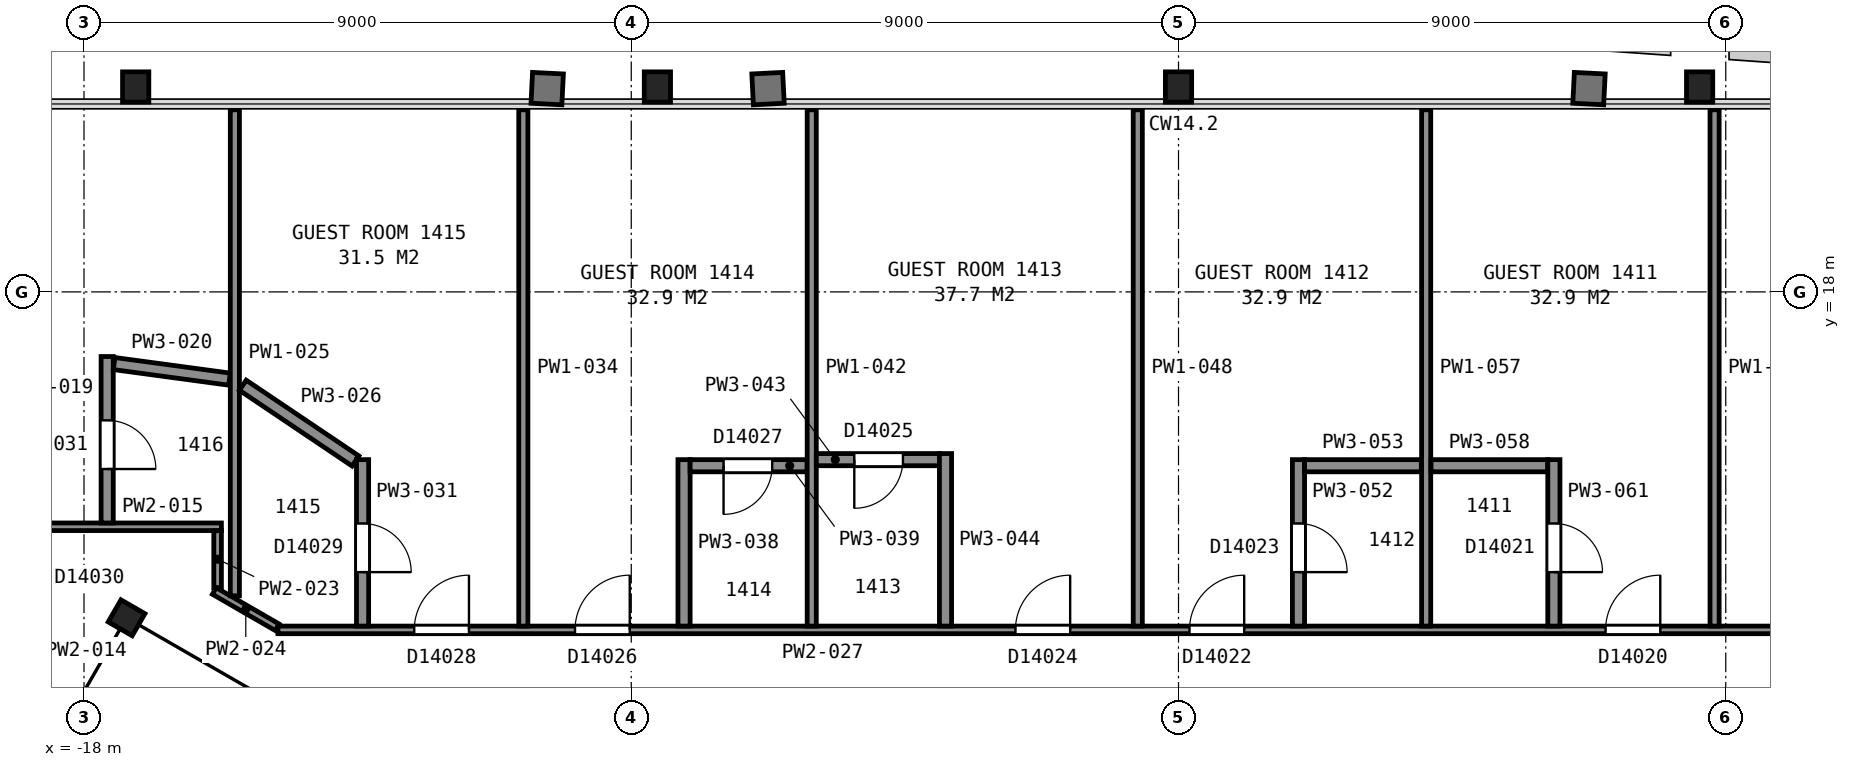
"""IFC4 building model, lengths in metres.
Left out: names, types, materials, properties, quantities, classifications, styles, units other than length and angle.
Written with IfcOpenShell. Run it as: python <this file> out.ifc"""

import sys

from ifc_helpers import new_model, si_unit, direction, frame, frame_2d, origin, origin_2d, place, context, subcontext, project, spatial, rectangle, i_section, extrude, element, fill, save


model = new_model("IFC4")
c1 = context("Model", 3, precision=1e-05, world=origin(), true_north=direction((0.0, 1.0)))
c2 = subcontext(c1, "Body", "Model", "MODEL_VIEW")
j1 = project(units=[si_unit("LENGTHUNIT", "METRE"), si_unit("PLANEANGLEUNIT", "RADIAN")], contexts=[c1])
p1 = place(None, origin())
s1 = spatial("IfcSite", under=j1, at=p1, CompositionType="ELEMENT")
p2 = place(p1, origin())
s2 = spatial("IfcBuilding", under=s1, at=p2, CompositionType="ELEMENT")
p3 = place(p2, frame((0.0, 0.0, 65.6)))
s3 = spatial("IfcBuildingStorey", under=s2, at=p3, CompositionType="ELEMENT", Elevation=65.6)
for number, where, z_axis, x_axis in (
    (1, (8.57, 21.37, 0.025), (0.0, 0.0, 1.0), (1.0, 0.0, 0.0)),
    (2, (0.0, 21.37, 0.025), (0.0, 0.0, 1.0), (1.0, 0.0, 0.0)),
    (3, (-8.57, 21.37, 0.025), (0.0, 0.0, 1.0), (1.0, 0.0, 0.0)),
    (4, (-17.15, 21.37, 0.025), (0.0, 0.0, 1.0), (1.0, 0.0, 0.0)),
):
    element("IfcColumn", number, at=place(p3, frame(where, z_axis=z_axis, x_axis=x_axis)), inside=s3, PredefinedType="COLUMN", context=c2, shape_type="SweptSolid", body=[
        extrude(i_section(OverallWidth=0.432, OverallDepth=0.498, WebThickness=0.056, FlangeThickness=0.089, FilletRadius=0.015, at=origin_2d()), origin(), (0.0, 0.0, 1.0), 3.575),
    ])
p4 = place(p3, frame((-17.3, 12.64, 0.0), z_axis=(0.0, 0.0, 1.0), x_axis=(0.5, 0.866025403784, 0.0)))
e5 = element("IfcColumn", 5, at=p4, inside=s3, PredefinedType="COLUMN", context=c2, shape_type="SweptSolid", body=[
    extrude(i_section(OverallWidth=0.419, OverallDepth=0.455, WebThickness=0.042, FlangeThickness=0.068, FilletRadius=0.015, at=origin_2d()), origin(), (0.0, 0.0, 1.0), 3.6),
])
p5 = place(p3, frame((-18.86, 14.137, 0.0), z_axis=(0.0, 0.0, 1.0), x_axis=(1.0, 0.0, 0.0)))
e6 = element("IfcWall", 6, at=p5, inside=s3, PredefinedType="PARTITIONING", context=c2, shape_type="SweptSolid", body=[
    extrude(rectangle(XDim=3.119, YDim=0.125, at=frame_2d((1.56, 0.0))), origin(), (0.0, 0.0, 1.0), 2.613),
])
p6 = place(p3, frame((-17.619, 16.937, 0.0), z_axis=(0.0, 0.0, 1.0), x_axis=(0.0, -1.0, 0.0)))
e7 = element("IfcWall", 7, at=p6, inside=s3, PredefinedType="PARTITIONING", context=c2, shape_type="SweptSolid", body=[
    extrude(rectangle(XDim=2.738, YDim=0.2, at=frame_2d((1.369, 0.0))), origin(), (0.0, 0.0, 1.0), 2.613),
])
p7 = place(p6, frame((1.05, 0.0, 0.0)))
e8 = element("IfcOpeningElement", 8, at=p7, cuts=e7, PredefinedType="OPENING", context=c2, shape_type="SweptSolid", body=[
    extrude(rectangle(XDim=0.8, YDim=2.1, at=frame_2d((0.4, 1.05))), frame((0.0, 0.11, 0.0), z_axis=(0.0, -1.0, 0.0), x_axis=(1.0, 0.0, 0.0)), (0.0, 0.0, 1.0), 0.22),
])
p8 = place(p3, frame((-17.505, 16.822, 0.0), z_axis=(0.0, 0.0, 1.0), x_axis=(0.990982367401, -0.133992341199, 0.0)))
e9 = element("IfcWall", 9, at=p8, inside=s3, PredefinedType="PARTITIONING", context=c2, shape_type="SweptSolid", body=[
    extrude(rectangle(XDim=1.915, YDim=0.2, at=frame_2d((0.958, 0.0))), origin(), (0.0, 0.0, 1.0), 2.613),
])
p9 = place(p3, frame((-15.803, 13.135, 0.0), z_axis=(0.0, 0.0, 1.0), x_axis=(0.0, 1.0, 0.0)))
e10 = element("IfcWall", 10, at=p9, inside=s3, PredefinedType="PARTITIONING", context=c2, shape_type="SweptSolid", body=[
    extrude(rectangle(XDim=0.937, YDim=0.125, at=frame_2d((0.469, 0.0))), origin(), (0.0, 0.0, 1.0), 2.613),
])
p10 = place(p3, frame((-15.857, 13.081, 0.0), z_axis=(0.0, 0.0, 1.0), x_axis=(0.866035997947, -0.499981649923, 0.0)))
e11 = element("IfcWall", 11, at=p10, inside=s3, PredefinedType="PARTITIONING", context=c2, shape_type="SweptSolid", body=[
    extrude(rectangle(XDim=1.196, YDim=0.125, at=frame_2d((0.598, 0.0))), origin(), (0.0, 0.0, 1.0), 2.613),
])
p11 = place(p3, frame((-15.519, 13.001, 0.0), z_axis=(0.0, 0.0, 1.0), x_axis=(0.0, 1.0, 0.0)))
e12 = element("IfcWall", 12, at=p11, inside=s3, PredefinedType="PARTITIONING", context=c2, shape_type="SweptSolid", body=[
    extrude(rectangle(XDim=7.994, YDim=0.15, at=frame_2d((3.997, 0.0))), origin(), (0.0, 0.0, 1.0), 2.613),
])
p12 = place(p3, frame((-15.388, 16.465, 0.0), z_axis=(0.0, 0.0, 1.0), x_axis=(0.82987399284, -0.557950854474, 0.0)))
e13 = element("IfcWall", 13, at=p12, inside=s3, PredefinedType="PARTITIONING", context=c2, shape_type="SweptSolid", body=[
    extrude(rectangle(XDim=2.233, YDim=0.2, at=frame_2d((1.116, 0.0))), origin(), (0.0, 0.0, 1.0), 2.613),
])
p13 = place(p3, frame((-14.811, 12.441, 0.0), z_axis=(0.0, 0.0, 1.0), x_axis=(1.0, 0.0, 0.0)))
e14 = element("IfcWall", 14, at=p13, inside=s3, PredefinedType="PARTITIONING", context=c2, shape_type="SweptSolid", body=[
    extrude(rectangle(XDim=29.621, YDim=0.125, at=frame_2d((14.811, 0.0))), origin(), (0.0, 0.0, 1.0), 2.613),
])
p14 = place(p13, frame((25.326, 0.0, 0.0)))
e15 = element("IfcOpeningElement", 15, at=p14, cuts=e14, PredefinedType="OPENING", context=c2, shape_type="SweptSolid", body=[
    extrude(rectangle(XDim=0.9, YDim=2.1, at=frame_2d((0.45, 1.05))), frame((0.0, 0.073, 0.0), z_axis=(0.0, -1.0, 0.0), x_axis=(1.0, 0.0, 0.0)), (0.0, 0.0, 1.0), 0.145),
])
p15 = place(p13, frame((21.833, 0.0, 0.0)))
e16 = element("IfcOpeningElement", 16, at=p15, cuts=e14, PredefinedType="OPENING", context=c2, shape_type="SweptSolid", body=[
    extrude(rectangle(XDim=0.9, YDim=2.1, at=frame_2d((0.45, 1.05))), frame((0.0, 0.073, 0.0), z_axis=(0.0, -1.0, 0.0), x_axis=(1.0, 0.0, 0.0)), (0.0, 0.0, 1.0), 0.145),
])
p16 = place(p13, frame((14.99, 0.0, 0.0)))
e17 = element("IfcOpeningElement", 17, at=p16, cuts=e14, PredefinedType="OPENING", context=c2, shape_type="SweptSolid", body=[
    extrude(rectangle(XDim=0.9, YDim=2.1, at=frame_2d((0.45, 1.05))), frame((0.0, 0.073, 0.0), z_axis=(0.0, -1.0, 0.0), x_axis=(1.0, 0.0, 0.0)), (0.0, 0.0, 1.0), 0.145),
])
p17 = place(p13, frame((12.128, 0.0, 0.0)))
e18 = element("IfcOpeningElement", 18, at=p17, cuts=e14, PredefinedType="OPENING", context=c2, shape_type="SweptSolid", body=[
    extrude(rectangle(XDim=0.9, YDim=2.1, at=frame_2d((0.45, 1.05))), frame((0.0, 0.073, 0.0), z_axis=(0.0, -1.0, 0.0), x_axis=(1.0, 0.0, 0.0)), (0.0, 0.0, 1.0), 0.145),
])
p18 = place(p13, frame((4.885, 0.0, 0.0)))
e19 = element("IfcOpeningElement", 19, at=p18, cuts=e14, PredefinedType="OPENING", context=c2, shape_type="SweptSolid", body=[
    extrude(rectangle(XDim=0.9, YDim=2.1, at=frame_2d((0.45, 1.05))), frame((0.0, 0.073, 0.0), z_axis=(0.0, -1.0, 0.0), x_axis=(1.0, 0.0, 0.0)), (0.0, 0.0, 1.0), 0.145),
])
p19 = place(p13, frame((2.241, 0.0, 0.0)))
e20 = element("IfcOpeningElement", 20, at=p19, cuts=e14, PredefinedType="OPENING", context=c2, shape_type="SweptSolid", body=[
    extrude(rectangle(XDim=0.9, YDim=2.1, at=frame_2d((0.45, 1.05))), frame((0.0, 0.073, 0.0), z_axis=(0.0, -1.0, 0.0), x_axis=(1.0, 0.0, 0.0)), (0.0, 0.0, 1.0), 0.145),
])
p20 = place(p3, frame((-13.419, 12.503, 0.0), z_axis=(0.0, 0.0, 1.0), x_axis=(0.0, 1.0, 0.0)))
e21 = element("IfcWall", 21, at=p20, inside=s3, PredefinedType="PARTITIONING", context=c2, shape_type="SweptSolid", body=[
    extrude(rectangle(XDim=2.738, YDim=0.2, at=frame_2d((1.369, 0.0))), origin(), (0.0, 0.0, 1.0), 2.613),
])
p21 = place(p20, frame((0.887, 0.0, 0.0)))
e22 = element("IfcOpeningElement", 22, at=p21, cuts=e21, PredefinedType="OPENING", context=c2, shape_type="SweptSolid", body=[
    extrude(rectangle(XDim=0.8, YDim=2.1, at=frame_2d((0.4, 1.05))), frame((0.0, 0.11, 0.0), z_axis=(0.0, -1.0, 0.0), x_axis=(1.0, 0.0, 0.0)), (0.0, 0.0, 1.0), 0.22),
])
p22 = place(p3, frame((-10.775, 12.503, 0.0), z_axis=(0.0, 0.0, 1.0), x_axis=(0.0, 1.0, 0.0)))
e23 = element("IfcWall", 23, at=p22, inside=s3, PredefinedType="PARTITIONING", context=c2, shape_type="SweptSolid", body=[
    extrude(rectangle(XDim=8.492, YDim=0.15, at=frame_2d((4.246, 0.0))), origin(), (0.0, 0.0, 1.0), 2.613),
])
p23 = place(p3, frame((-8.132, 12.503, 0.0), z_axis=(0.0, 0.0, 1.0), x_axis=(0.0, 1.0, 0.0)))
e24 = element("IfcWall", 24, at=p23, inside=s3, PredefinedType="PARTITIONING", context=c2, shape_type="SweptSolid", body=[
    extrude(rectangle(XDim=2.738, YDim=0.2, at=frame_2d((1.369, 0.0))), origin(), (0.0, 0.0, 1.0), 2.613),
])
p24 = place(p3, frame((-6.107, 15.141, 0.0), z_axis=(0.0, 0.0, 1.0), x_axis=(-1.0, 0.0, 0.0)))
e25 = element("IfcWall", 25, at=p24, inside=s3, PredefinedType="PARTITIONING", context=c2, shape_type="SweptSolid", body=[
    extrude(rectangle(XDim=1.925, YDim=0.2, at=frame_2d((0.962, 0.0))), origin(), (0.0, 0.0, 1.0), 2.613),
])
p25 = place(p24, frame((0.575, 0.0, 0.0)))
e26 = element("IfcOpeningElement", 26, at=p25, cuts=e25, PredefinedType="OPENING", context=c2, shape_type="SweptSolid", body=[
    extrude(rectangle(XDim=0.8, YDim=2.1, at=frame_2d((0.4, 1.05))), frame((0.0, 0.11, 0.0), z_axis=(0.0, -1.0, 0.0), x_axis=(1.0, 0.0, 0.0)), (0.0, 0.0, 1.0), 0.22),
])
p26 = place(p3, frame((-6.032, 12.503, 0.0), z_axis=(0.0, 0.0, 1.0), x_axis=(0.0, 1.0, 0.0)))
e27 = element("IfcWall", 27, at=p26, inside=s3, PredefinedType="PARTITIONING", context=c2, shape_type="SweptSolid", body=[
    extrude(rectangle(XDim=8.492, YDim=0.15, at=frame_2d((4.246, 0.0))), origin(), (0.0, 0.0, 1.0), 2.613),
])
p27 = place(p3, frame((-3.932, 15.241, 0.0), z_axis=(0.0, 0.0, 1.0), x_axis=(-1.0, 0.0, 0.0)))
e28 = element("IfcWall", 28, at=p27, inside=s3, PredefinedType="PARTITIONING", context=c2, shape_type="SweptSolid", body=[
    extrude(rectangle(XDim=2.025, YDim=0.2, at=frame_2d((1.013, 0.0))), origin(), (0.0, 0.0, 1.0), 2.613),
])
p28 = place(p27, frame((0.6, 0.0, 0.0)))
e29 = element("IfcOpeningElement", 29, at=p28, cuts=e28, PredefinedType="OPENING", context=c2, shape_type="SweptSolid", body=[
    extrude(rectangle(XDim=0.8, YDim=2.1, at=frame_2d((0.4, 1.05))), frame((0.0, 0.11, 0.0), z_axis=(0.0, -1.0, 0.0), x_axis=(1.0, 0.0, 0.0)), (0.0, 0.0, 1.0), 0.22),
])
p29 = place(p3, frame((-3.832, 12.503, 0.0), z_axis=(0.0, 0.0, 1.0), x_axis=(0.0, 1.0, 0.0)))
e30 = element("IfcWall", 30, at=p29, inside=s3, PredefinedType="PARTITIONING", context=c2, shape_type="SweptSolid", body=[
    extrude(rectangle(XDim=2.838, YDim=0.2, at=frame_2d((1.419, 0.0))), origin(), (0.0, 0.0, 1.0), 2.613),
])
p30 = place(p3, frame((-0.67, 12.503, 0.0), z_axis=(0.0, 0.0, 1.0), x_axis=(0.0, 1.0, 0.0)))
e31 = element("IfcWall", 31, at=p30, inside=s3, PredefinedType="PARTITIONING", context=c2, shape_type="SweptSolid", body=[
    extrude(rectangle(XDim=8.492, YDim=0.15, at=frame_2d((4.246, 0.0))), origin(), (0.0, 0.0, 1.0), 2.613),
])
p31 = place(p3, frame((1.973, 15.241, 0.0), z_axis=(0.0, 0.0, 1.0), x_axis=(0.0, -1.0, 0.0)))
e32 = element("IfcWall", 32, at=p31, inside=s3, PredefinedType="PARTITIONING", context=c2, shape_type="SweptSolid", body=[
    extrude(rectangle(XDim=2.738, YDim=0.2, at=frame_2d((1.369, 0.0))), origin(), (0.0, 0.0, 1.0), 2.613),
])
p32 = place(p31, frame((1.05, 0.0, 0.0)))
e33 = element("IfcOpeningElement", 33, at=p32, cuts=e32, PredefinedType="OPENING", context=c2, shape_type="SweptSolid", body=[
    extrude(rectangle(XDim=0.8, YDim=2.1, at=frame_2d((0.4, 1.05))), frame((0.0, 0.11, 0.0), z_axis=(0.0, -1.0, 0.0), x_axis=(1.0, 0.0, 0.0)), (0.0, 0.0, 1.0), 0.22),
])
p33 = place(p3, frame((2.073, 15.141, 0.0), z_axis=(0.0, 0.0, 1.0), x_axis=(1.0, 0.0, 0.0)))
e34 = element("IfcWall", 34, at=p33, inside=s3, PredefinedType="PARTITIONING", context=c2, shape_type="SweptSolid", body=[
    extrude(rectangle(XDim=1.92, YDim=0.2, at=frame_2d((0.96, 0.0))), origin(), (0.0, 0.0, 1.0), 2.613),
])
p34 = place(p3, frame((4.073, 12.503, 0.0), z_axis=(0.0, 0.0, 1.0), x_axis=(0.0, 1.0, 0.0)))
e35 = element("IfcWall", 35, at=p34, inside=s3, PredefinedType="PARTITIONING", context=c2, shape_type="SweptSolid", body=[
    extrude(rectangle(XDim=8.492, YDim=0.15, at=frame_2d((4.246, 0.0))), origin(), (0.0, 0.0, 1.0), 2.613),
])
p35 = place(p3, frame((4.153, 15.141, 0.0), z_axis=(0.0, 0.0, 1.0), x_axis=(1.0, 0.0, 0.0)))
e36 = element("IfcWall", 36, at=p35, inside=s3, PredefinedType="PARTITIONING", context=c2, shape_type="SweptSolid", body=[
    extrude(rectangle(XDim=1.92, YDim=0.2, at=frame_2d((0.96, 0.0))), origin(), (0.0, 0.0, 1.0), 2.613),
])
p36 = place(p3, frame((6.173, 12.503, 0.0), z_axis=(0.0, 0.0, 1.0), x_axis=(0.0, 1.0, 0.0)))
e37 = element("IfcWall", 37, at=p36, inside=s3, PredefinedType="PARTITIONING", context=c2, shape_type="SweptSolid", body=[
    extrude(rectangle(XDim=2.738, YDim=0.2, at=frame_2d((1.369, 0.0))), origin(), (0.0, 0.0, 1.0), 2.613),
])
p37 = place(p36, frame((0.887, 0.0, 0.0)))
e38 = element("IfcOpeningElement", 38, at=p37, cuts=e37, PredefinedType="OPENING", context=c2, shape_type="SweptSolid", body=[
    extrude(rectangle(XDim=0.8, YDim=2.1, at=frame_2d((0.4, 1.05))), frame((0.0, 0.11, 0.0), z_axis=(0.0, -1.0, 0.0), x_axis=(1.0, 0.0, 0.0)), (0.0, 0.0, 1.0), 0.22),
])
p38 = place(p3, frame((8.816, 12.503, 0.0), z_axis=(0.0, 0.0, 1.0), x_axis=(0.0, 1.0, 0.0)))
e39 = element("IfcWall", 39, at=p38, inside=s3, PredefinedType="PARTITIONING", context=c2, shape_type="SweptSolid", body=[
    extrude(rectangle(XDim=8.492, YDim=0.15, at=frame_2d((4.246, 0.0))), origin(), (0.0, 0.0, 1.0), 2.613),
])
p39 = place(p7, origin())
e40 = element("IfcDoor", 40, at=p39, inside=s3, OperationType="SINGLE_SWING_RIGHT", PredefinedType="DOOR", context=c2, shape_type="SweptSolid", body=[
    extrude(rectangle(XDim=0.8, YDim=2.1, at=frame_2d((0.4, 1.05))), frame((0.0, 0.025, 0.0), z_axis=(0.0, -1.0, 0.0), x_axis=(1.0, 0.0, 0.0)), (0.0, 0.0, 1.0), 0.05),
])
fill(e8, e40)
p40 = place(p15, origin())
e41 = element("IfcDoor", 41, at=p40, inside=s3, OperationType="SINGLE_SWING_RIGHT", PredefinedType="DOOR", context=c2, shape_type="SweptSolid", body=[
    extrude(rectangle(XDim=0.9, YDim=2.1, at=frame_2d((0.45, 1.05))), frame((0.0, 0.025, 0.0), z_axis=(0.0, -1.0, 0.0), x_axis=(1.0, 0.0, 0.0)), (0.0, 0.0, 1.0), 0.05),
])
fill(e16, e41)
p41 = place(p16, origin())
e42 = element("IfcDoor", 42, at=p41, inside=s3, OperationType="SINGLE_SWING_RIGHT", PredefinedType="DOOR", context=c2, shape_type="SweptSolid", body=[
    extrude(rectangle(XDim=0.9, YDim=2.1, at=frame_2d((0.45, 1.05))), frame((0.0, 0.025, 0.0), z_axis=(0.0, -1.0, 0.0), x_axis=(1.0, 0.0, 0.0)), (0.0, 0.0, 1.0), 0.05),
])
fill(e17, e42)
p42 = place(p17, origin())
e43 = element("IfcDoor", 43, at=p42, inside=s3, OperationType="SINGLE_SWING_RIGHT", PredefinedType="DOOR", context=c2, shape_type="SweptSolid", body=[
    extrude(rectangle(XDim=0.9, YDim=2.1, at=frame_2d((0.45, 1.05))), frame((0.0, 0.025, 0.0), z_axis=(0.0, -1.0, 0.0), x_axis=(1.0, 0.0, 0.0)), (0.0, 0.0, 1.0), 0.05),
])
fill(e18, e43)
p43 = place(p18, origin())
e44 = element("IfcDoor", 44, at=p43, inside=s3, OperationType="SINGLE_SWING_RIGHT", PredefinedType="DOOR", context=c2, shape_type="SweptSolid", body=[
    extrude(rectangle(XDim=0.9, YDim=2.1, at=frame_2d((0.45, 1.05))), frame((0.0, 0.025, 0.0), z_axis=(0.0, -1.0, 0.0), x_axis=(1.0, 0.0, 0.0)), (0.0, 0.0, 1.0), 0.05),
])
fill(e19, e44)
p44 = place(p19, origin())
e45 = element("IfcDoor", 45, at=p44, inside=s3, OperationType="SINGLE_SWING_RIGHT", PredefinedType="DOOR", context=c2, shape_type="SweptSolid", body=[
    extrude(rectangle(XDim=0.9, YDim=2.1, at=frame_2d((0.45, 1.05))), frame((0.0, 0.025, 0.0), z_axis=(0.0, -1.0, 0.0), x_axis=(1.0, 0.0, 0.0)), (0.0, 0.0, 1.0), 0.05),
])
fill(e20, e45)
p45 = place(p21, origin())
e46 = element("IfcDoor", 46, at=p45, inside=s3, OperationType="SINGLE_SWING_LEFT", PredefinedType="DOOR", context=c2, shape_type="SweptSolid", body=[
    extrude(rectangle(XDim=0.8, YDim=2.1, at=frame_2d((0.4, 1.05))), frame((0.0, 0.025, 0.0), z_axis=(0.0, -1.0, 0.0), x_axis=(1.0, 0.0, 0.0)), (0.0, 0.0, 1.0), 0.05),
])
fill(e22, e46)
p46 = place(p25, origin())
e47 = element("IfcDoor", 47, at=p46, inside=s3, OperationType="SINGLE_SWING_RIGHT", PredefinedType="DOOR", context=c2, shape_type="SweptSolid", body=[
    extrude(rectangle(XDim=0.8, YDim=2.1, at=frame_2d((0.4, 1.05))), frame((0.0, 0.025, 0.0), z_axis=(0.0, -1.0, 0.0), x_axis=(1.0, 0.0, 0.0)), (0.0, 0.0, 1.0), 0.05),
])
fill(e26, e47)
p47 = place(p28, origin())
e48 = element("IfcDoor", 48, at=p47, inside=s3, OperationType="SINGLE_SWING_RIGHT", PredefinedType="DOOR", context=c2, shape_type="SweptSolid", body=[
    extrude(rectangle(XDim=0.8, YDim=2.1, at=frame_2d((0.4, 1.05))), frame((0.0, 0.025, 0.0), z_axis=(0.0, -1.0, 0.0), x_axis=(1.0, 0.0, 0.0)), (0.0, 0.0, 1.0), 0.05),
])
fill(e29, e48)
p48 = place(p32, origin())
e49 = element("IfcDoor", 49, at=p48, inside=s3, OperationType="SINGLE_SWING_RIGHT", PredefinedType="DOOR", context=c2, shape_type="SweptSolid", body=[
    extrude(rectangle(XDim=0.8, YDim=2.1, at=frame_2d((0.4, 1.05))), frame((0.0, 0.025, 0.0), z_axis=(0.0, -1.0, 0.0), x_axis=(1.0, 0.0, 0.0)), (0.0, 0.0, 1.0), 0.05),
])
fill(e33, e49)
p49 = place(p37, origin())
e50 = element("IfcDoor", 50, at=p49, inside=s3, OperationType="SINGLE_SWING_LEFT", PredefinedType="DOOR", context=c2, shape_type="SweptSolid", body=[
    extrude(rectangle(XDim=0.8, YDim=2.1, at=frame_2d((0.4, 1.05))), frame((0.0, 0.025, 0.0), z_axis=(0.0, -1.0, 0.0), x_axis=(1.0, 0.0, 0.0)), (0.0, 0.0, 1.0), 0.05),
])
fill(e38, e50)
save(model, sys.argv[1])
